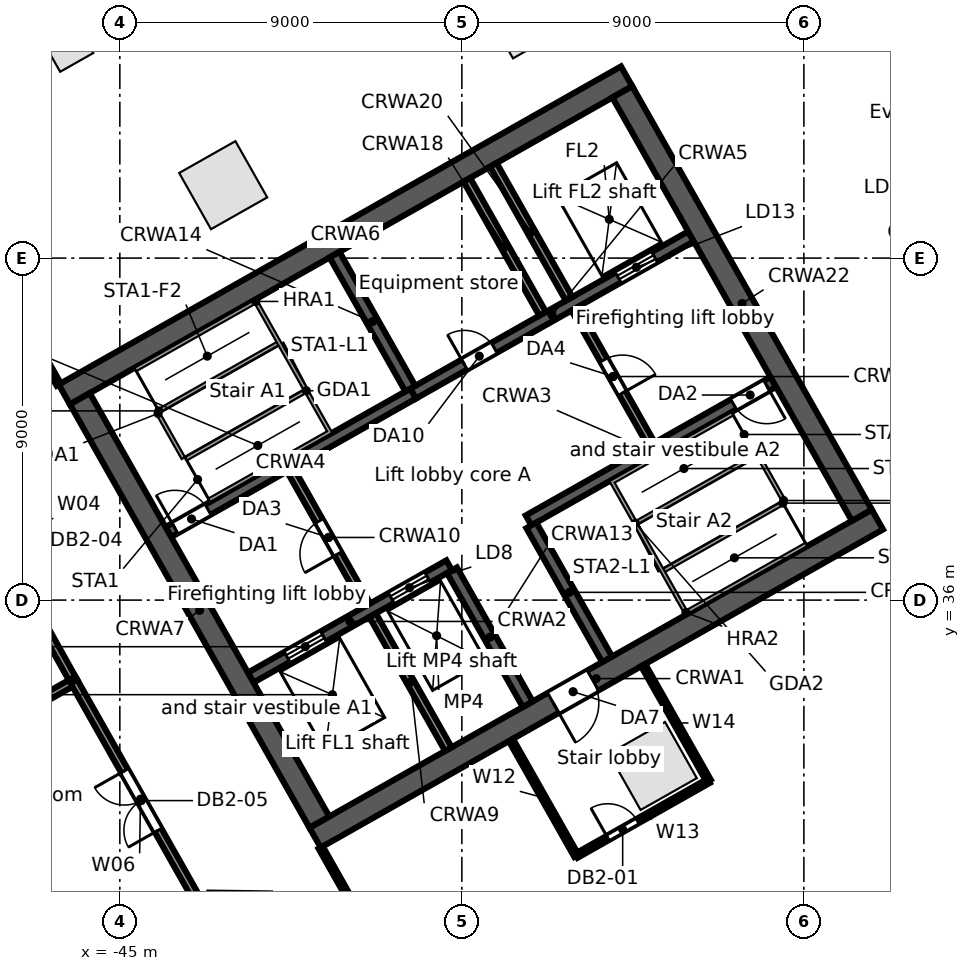
"""IFC4 building model, lengths in metres.
Left out: names, types, materials, properties, quantities, classifications, styles, units other than length and angle.
Written with IfcOpenShell. Run it as: python <this file> out.ifc"""

import sys

from ifc_helpers import new_model, si_unit, direction, frame, frame_2d, origin, origin_2d, place, context, subcontext, project, spatial, rectangle, extrude, element, fill, save


model = new_model("IFC4")
c1 = context("Model", 3, precision=1e-05, world=origin(), true_north=direction((0.0, 1.0)))
c2 = subcontext(c1, "Body", "Model", "MODEL_VIEW")
j1 = project(units=[si_unit("LENGTHUNIT", "METRE"), si_unit("PLANEANGLEUNIT", "RADIAN")], contexts=[c1])
p1 = place(None, origin())
s1 = spatial("IfcSite", under=j1, at=p1, CompositionType="ELEMENT")
p2 = place(p1, origin())
s2 = spatial("IfcBuilding", under=s1, at=p2, CompositionType="ELEMENT")
p3 = place(p2, frame((0.0, 0.0, -9.6)))
s3 = spatial("IfcBuildingStorey", under=s2, at=p3, CompositionType="ELEMENT", Elevation=-9.6)
p4 = place(p3, frame((-5.971, 78.503, -0.5), z_axis=(0.0, 0.0, 1.0), x_axis=(-0.870356741611, -0.492421711882, 0.0)))
e1 = element("IfcWall", 1, at=p4, inside=s3, PredefinedType="SOLIDWALL", context=c2, shape_type="SweptSolid", body=[
    extrude(rectangle(XDim=70.604, YDim=0.8, at=frame_2d((35.302, 0.0))), origin(), (0.0, 0.0, 1.0), 5.3),
])
p5 = place(p3, frame((-66.973, 30.208, -0.5), z_axis=(0.0, 0.0, 1.0), x_axis=(0.85716750858, -0.515037728943, 0.0)))
e2 = element("IfcWall", 2, at=p5, inside=s3, PredefinedType="SOLIDWALL", context=c2, shape_type="SweptSolid", body=[
    extrude(rectangle(XDim=24.44, YDim=0.8, at=frame_2d((12.22, 0.0))), origin(), (0.0, 0.0, 1.0), 5.3),
])
p6 = place(p3, frame((-35.211, 18.197, -0.5), z_axis=(0.0, 0.0, 1.0), x_axis=(0.870356230452, 0.492422615355, 0.0)))
e3 = element("IfcWall", 3, at=p6, inside=s3, PredefinedType="SOLIDWALL", context=c2, shape_type="SweptSolid", body=[
    extrude(rectangle(XDim=41.941, YDim=0.8, at=frame_2d((20.97, 0.0))), origin(), (0.0, 0.0, 1.0), 5.3),
])
for number, where, z_axis, x_axis in (
    (4, (-34.334, 51.414, -0.5), (0.0, 0.0, 1.0), (-0.87, -0.492, 0.0)),
    (5, (-42.28, 46.919, -0.5), (0.0, 0.0, 1.0), (-0.87, -0.492, 0.0)),
    (6, (-30.976, 31.635, -0.5), (0.0, 0.0, 1.0), (0.87, 0.492, 0.0)),
):
    element("IfcColumn", number, at=place(p3, frame(where, z_axis=z_axis, x_axis=x_axis)), inside=s3, PredefinedType="COLUMN", context=c2, shape_type="SweptSolid", body=[
        extrude(rectangle(XDim=1.7, YDim=1.7, at=origin_2d()), origin(), (0.0, 0.0, 1.0), 5.3),
    ])
p7 = place(p3, frame((-46.381, 50.584, -0.5), z_axis=(0.0, 0.0, 1.0), x_axis=(-0.87035569594, -0.492423560103, 0.0)))
e7 = element("IfcColumn", 7, at=p7, inside=s3, PredefinedType="COLUMN", context=c2, shape_type="SweptSolid", body=[
    extrude(rectangle(XDim=1.0, YDim=1.0, at=origin_2d()), origin(), (0.0, 0.0, 1.0), 5.3),
])
p8 = place(p3, frame((-39.862, 29.749, 0.0), z_axis=(0.0, 0.0, 1.0), x_axis=(0.870350116061, 0.492433422375, 0.0)))
e8 = element("IfcWall", 8, at=p8, inside=s3, PredefinedType="SOLIDWALL", context=c2, shape_type="SweptSolid", body=[
    extrude(rectangle(XDim=17.0, YDim=0.6, at=frame_2d((8.5, 0.0))), origin(), (0.0, 0.0, 1.0), 4.4),
])
p9 = place(p8, frame((7.2, 0.0, 0.0)))
e9 = element("IfcOpeningElement", 9, at=p9, cuts=e8, PredefinedType="OPENING", context=c2, shape_type="SweptSolid", body=[
    extrude(rectangle(XDim=1.2, YDim=2.1, at=frame_2d((0.6, 1.05))), frame((0.0, 0.31, 0.0), z_axis=(0.0, -1.0, 0.0), x_axis=(1.0, 0.0, 0.0)), (0.0, 0.0, 1.0), 0.62),
])
p10 = place(p3, frame((-41.556, 33.961, 0.0), z_axis=(0.0, 0.0, 1.0), x_axis=(0.870343731308, 0.492444706919, 0.0)))
e10 = element("IfcWall", 10, at=p10, inside=s3, PredefinedType="SOLIDWALL", context=c2, shape_type="SweptSolid", body=[
    extrude(rectangle(XDim=6.0, YDim=0.3, at=frame_2d((3.0, 0.0))), origin(), (0.0, 0.0, 1.0), 4.4),
])
p11 = place(p10, frame((1.1, 0.0, 0.0)))
e11 = element("IfcOpeningElement", 11, at=p11, cuts=e10, PredefinedType="OPENING", context=c2, shape_type="SweptSolid", body=[
    extrude(rectangle(XDim=1.1, YDim=2.1, at=frame_2d((0.55, 1.05))), frame((0.0, 0.16, 0.0), z_axis=(0.0, -1.0, 0.0), x_axis=(1.0, 0.0, 0.0)), (0.0, 0.0, 1.0), 0.32),
])
p12 = place(p10, frame((4.25, 0.0, 0.0)))
e12 = element("IfcOpeningElement", 12, at=p12, cuts=e10, PredefinedType="OPENING", context=c2, shape_type="SweptSolid", body=[
    extrude(rectangle(XDim=1.1, YDim=2.1, at=frame_2d((0.55, 1.05))), frame((0.0, 0.16, 0.0), z_axis=(0.0, -1.0, 0.0), x_axis=(1.0, 0.0, 0.0)), (0.0, 0.0, 1.0), 0.32),
])
p13 = place(p3, frame((-34.245, 38.097, 0.0), z_axis=(0.0, 0.0, 1.0), x_axis=(0.870364910201, 0.492407273597, 0.0)))
e13 = element("IfcWall", 13, at=p13, inside=s3, PredefinedType="SOLIDWALL", context=c2, shape_type="SweptSolid", body=[
    extrude(rectangle(XDim=7.4, YDim=0.3, at=frame_2d((3.7, 0.0))), origin(), (0.0, 0.0, 1.0), 4.4),
])
p14 = place(p13, frame((6.2, 0.0, 0.0)))
e14 = element("IfcOpeningElement", 14, at=p14, cuts=e13, PredefinedType="OPENING", context=c2, shape_type="SweptSolid", body=[
    extrude(rectangle(XDim=1.0, YDim=2.1, at=frame_2d((0.5, 1.05))), frame((0.0, 0.16, 0.0), z_axis=(0.0, -1.0, 0.0), x_axis=(1.0, 0.0, 0.0)), (0.0, 0.0, 1.0), 0.32),
])
p15 = place(p3, frame((-43.723, 37.791, 0.0), z_axis=(0.0, 0.0, 1.0), x_axis=(0.87035077051, 0.49243226567, 0.0)))
e15 = element("IfcWall", 15, at=p15, inside=s3, PredefinedType="SOLIDWALL", context=c2, shape_type="SweptSolid", body=[
    extrude(rectangle(XDim=7.4, YDim=0.3, at=frame_2d((3.7, 0.0))), origin(), (0.0, 0.0, 1.0), 4.4),
])
p16 = place(p15, frame((0.2, 0.0, 0.0)))
e16 = element("IfcOpeningElement", 16, at=p16, cuts=e15, PredefinedType="OPENING", context=c2, shape_type="SweptSolid", body=[
    extrude(rectangle(XDim=1.0, YDim=2.1, at=frame_2d((0.5, 1.05))), frame((0.0, 0.16, 0.0), z_axis=(0.0, -1.0, 0.0), x_axis=(1.0, 0.0, 0.0)), (0.0, 0.0, 1.0), 0.32),
])
p17 = place(p3, frame((-37.282, 41.435, 0.0), z_axis=(0.0, 0.0, 1.0), x_axis=(0.870356516133, 0.492422110414, 0.0)))
e17 = element("IfcWall", 17, at=p17, inside=s3, PredefinedType="SOLIDWALL", context=c2, shape_type="SweptSolid", body=[
    extrude(rectangle(XDim=8.4, YDim=0.3, at=frame_2d((4.2, 0.0))), origin(), (0.0, 0.0, 1.0), 4.4),
])
p18 = place(p17, frame((6.2, 0.0, 0.0)))
e18 = element("IfcOpeningElement", 18, at=p18, cuts=e17, PredefinedType="OPENING", context=c2, shape_type="SweptSolid", body=[
    extrude(rectangle(XDim=1.1, YDim=2.1, at=frame_2d((0.55, 1.05))), frame((0.0, 0.16, 0.0), z_axis=(0.0, -1.0, 0.0), x_axis=(1.0, 0.0, 0.0)), (0.0, 0.0, 1.0), 0.32),
])
p19 = place(p17, frame((1.55, 0.0, 0.0)))
e19 = element("IfcOpeningElement", 19, at=p19, cuts=e17, PredefinedType="OPENING", context=c2, shape_type="SweptSolid", body=[
    extrude(rectangle(XDim=0.9, YDim=2.1, at=frame_2d((0.45, 1.05))), frame((0.0, 0.16, 0.0), z_axis=(0.0, -1.0, 0.0), x_axis=(1.0, 0.0, 0.0)), (0.0, 0.0, 1.0), 0.32),
])
p20 = place(p3, frame((-46.461, 41.412, 0.0), z_axis=(0.0, 0.0, 1.0), x_axis=(0.870350116061, 0.492433422375, 0.0)))
e20 = element("IfcWall", 20, at=p20, inside=s3, PredefinedType="SOLIDWALL", context=c2, shape_type="SweptSolid", body=[
    extrude(rectangle(XDim=17.0, YDim=0.6, at=frame_2d((8.5, 0.0))), origin(), (0.0, 0.0, 1.0), 4.4),
])
p21 = place(p3, frame((-46.052, 41.298, 0.0), z_axis=(0.0, 0.0, 1.0), x_axis=(0.492418598281, -0.870358503186, 0.0)))
e21 = element("IfcWall", 21, at=p21, inside=s3, PredefinedType="SOLIDWALL", context=c2, shape_type="SweptSolid", body=[
    extrude(rectangle(XDim=12.8, YDim=0.6, at=frame_2d((6.4, 0.0))), origin(), (0.0, 0.0, 1.0), 4.4),
])
p22 = place(p3, frame((-38.349, 35.603, 0.0), z_axis=(0.0, 0.0, 1.0), x_axis=(0.49241474071, -0.870360685654, 0.0)))
e22 = element("IfcWall", 22, at=p22, inside=s3, PredefinedType="SOLIDWALL", context=c2, shape_type="SweptSolid", body=[
    extrude(rectangle(XDim=4.05, YDim=0.2, at=frame_2d((2.025, 0.0))), origin(), (0.0, 0.0, 1.0), 4.4),
])
p23 = place(p3, frame((-40.516, 39.433, 0.0), z_axis=(0.0, 0.0, 1.0), x_axis=(0.492453559952, -0.87033872216, 0.0)))
e23 = element("IfcWall", 23, at=p23, inside=s3, PredefinedType="PARTITIONING", context=c2, shape_type="SweptSolid", body=[
    extrude(rectangle(XDim=4.1, YDim=0.2, at=frame_2d((2.05, 0.0))), origin(), (0.0, 0.0, 1.0), 4.4),
])
p24 = place(p23, frame((1.55, 0.0, 0.0)))
e24 = element("IfcOpeningElement", 24, at=p24, cuts=e23, PredefinedType="OPENING", context=c2, shape_type="SweptSolid", body=[
    extrude(rectangle(XDim=1.0, YDim=2.1, at=frame_2d((0.5, 1.05))), frame((0.0, 0.11, 0.0), z_axis=(0.0, -1.0, 0.0), x_axis=(1.0, 0.0, 0.0)), (0.0, 0.0, 1.0), 0.22),
])
p25 = place(p3, frame((-36.26, 36.785, 0.0), z_axis=(0.0, 0.0, 1.0), x_axis=(0.492440575896, -0.870346068648, 0.0)))
e25 = element("IfcWall", 25, at=p25, inside=s3, PredefinedType="SOLIDWALL", context=c2, shape_type="SweptSolid", body=[
    extrude(rectangle(XDim=4.05, YDim=0.3, at=frame_2d((2.025, 0.0))), origin(), (0.0, 0.0, 1.0), 4.4),
])
p26 = place(p3, frame((-39.35, 45.09, 0.0), z_axis=(0.0, 0.0, 1.0), x_axis=(0.49241474071, -0.870360685654, 0.0)))
e26 = element("IfcWall", 26, at=p26, inside=s3, PredefinedType="SOLIDWALL", context=c2, shape_type="SweptSolid", body=[
    extrude(rectangle(XDim=4.05, YDim=0.3, at=frame_2d((2.025, 0.0))), origin(), (0.0, 0.0, 1.0), 4.4),
])
p27 = place(p3, frame((-34.171, 37.967, 0.0), z_axis=(0.0, 0.0, 1.0), x_axis=(0.492394910396, -0.870371904542, 0.0)))
e27 = element("IfcWall", 27, at=p27, inside=s3, PredefinedType="SOLIDWALL", context=c2, shape_type="SweptSolid", body=[
    extrude(rectangle(XDim=4.05, YDim=0.3, at=frame_2d((2.025, 0.0))), origin(), (0.0, 0.0, 1.0), 4.4),
])
p28 = place(p3, frame((-35.869, 47.06, 0.0), z_axis=(0.0, 0.0, 1.0), x_axis=(0.49241474071, -0.870360685654, 0.0)))
e28 = element("IfcWall", 28, at=p28, inside=s3, PredefinedType="SOLIDWALL", context=c2, shape_type="SweptSolid", body=[
    extrude(rectangle(XDim=4.05, YDim=0.2, at=frame_2d((2.025, 0.0))), origin(), (0.0, 0.0, 1.0), 4.4),
])
p29 = place(p3, frame((-33.031, 43.667, 0.0), z_axis=(0.0, 0.0, 1.0), x_axis=(0.492408451753, -0.87036424366, 0.0)))
e29 = element("IfcWall", 29, at=p29, inside=s3, PredefinedType="PARTITIONING", context=c2, shape_type="SweptSolid", body=[
    extrude(rectangle(XDim=4.1, YDim=0.2, at=frame_2d((2.05, 0.0))), origin(), (0.0, 0.0, 1.0), 4.4),
])
p30 = place(p29, frame((1.55, 0.0, 0.0)))
e30 = element("IfcOpeningElement", 30, at=p30, cuts=e29, PredefinedType="OPENING", context=c2, shape_type="SweptSolid", body=[
    extrude(rectangle(XDim=1.0, YDim=2.1, at=frame_2d((0.5, 1.05))), frame((0.0, 0.11, 0.0), z_axis=(0.0, -1.0, 0.0), x_axis=(1.0, 0.0, 0.0)), (0.0, 0.0, 1.0), 0.22),
])
p31 = place(p3, frame((-35.173, 47.454, 0.0), z_axis=(0.0, 0.0, 1.0), x_axis=(0.492440575896, -0.870346068648, 0.0)))
e31 = element("IfcWall", 31, at=p31, inside=s3, PredefinedType="SOLIDWALL", context=c2, shape_type="SweptSolid", body=[
    extrude(rectangle(XDim=4.05, YDim=0.2, at=frame_2d((2.025, 0.0))), origin(), (0.0, 0.0, 1.0), 4.4),
])
p32 = place(p3, frame((-31.778, 49.374, 0.0), z_axis=(0.0, 0.0, 1.0), x_axis=(0.492433046652, -0.870350328641, 0.0)))
e32 = element("IfcWall", 32, at=p32, inside=s3, PredefinedType="SOLIDWALL", context=c2, shape_type="SweptSolid", body=[
    extrude(rectangle(XDim=12.8, YDim=0.6, at=frame_2d((6.4, 0.0))), origin(), (0.0, 0.0, 1.0), 4.4),
])
p33 = place(p3, frame((-52.342, 51.808, 0.0), z_axis=(0.0, 0.0, 1.0), x_axis=(0.492361213904, -0.870390966775, 0.0)))
e33 = element("IfcWall", 33, at=p33, inside=s3, PredefinedType="PARTITIONING", context=c2, shape_type="SweptSolid", body=[
    extrude(rectangle(XDim=11.644, YDim=0.125, at=frame_2d((5.822, 0.0))), origin(), (0.0, 0.0, 1.0), 3.68),
])
p34 = place(p33, frame((5.45, 0.0, 0.0)))
e34 = element("IfcOpeningElement", 34, at=p34, cuts=e33, PredefinedType="OPENING", context=c2, shape_type="SweptSolid", body=[
    extrude(rectangle(XDim=0.9, YDim=2.1, at=frame_2d((0.45, 1.05))), frame((0.0, 0.073, 0.0), z_axis=(0.0, -1.0, 0.0), x_axis=(1.0, 0.0, 0.0)), (0.0, 0.0, 1.0), 0.145),
])
p35 = place(p3, frame((-51.43, 30.902, 0.0), z_axis=(0.0, 0.0, 1.0), x_axis=(0.85415757912, -0.52001425945, 0.0)))
e35 = element("IfcWall", 35, at=p35, inside=s3, PredefinedType="PARTITIONING", context=c2, shape_type="SweptSolid", body=[
    extrude(rectangle(XDim=12.311, YDim=0.2, at=frame_2d((6.156, 0.0))), origin(), (0.0, 0.0, 1.0), 3.768),
])
p36 = place(p3, frame((-50.397, 41.35, 0.0), z_axis=(0.0, 0.0, 1.0), x_axis=(0.487964129566, -0.872863682517, 0.0)))
e36 = element("IfcWall", 36, at=p36, inside=s3, PredefinedType="PARTITIONING", context=c2, shape_type="SweptSolid", body=[
    extrude(rectangle(XDim=8.584, YDim=0.2, at=frame_2d((4.292, 0.0))), origin(), (0.0, 0.0, 1.0), 3.462),
])
p37 = place(p36, frame((3.45, 0.0, 0.0)))
e37 = element("IfcOpeningElement", 37, at=p37, cuts=e36, PredefinedType="OPENING", context=c2, shape_type="SweptSolid", body=[
    extrude(rectangle(XDim=1.8, YDim=2.1, at=frame_2d((0.9, 1.05))), frame((0.0, 0.11, 0.0), z_axis=(0.0, -1.0, 0.0), x_axis=(1.0, 0.0, 0.0)), (0.0, 0.0, 1.0), 0.22),
])
p38 = place(p3, frame((-49.928, 31.752, 0.0), z_axis=(0.0, 0.0, 1.0), x_axis=(0.87032337569, 0.492480681578, 0.0)))
e38 = element("IfcWall", 38, at=p38, inside=s3, PredefinedType="PARTITIONING", context=c2, shape_type="SweptSolid", body=[
    extrude(rectangle(XDim=4.274, YDim=0.2, at=frame_2d((2.137, 0.0))), origin(), (0.0, 0.0, 1.0), 4.4),
])
p39 = place(p3, frame((-46.208, 33.857, 0.0), z_axis=(0.0, 0.0, 1.0), x_axis=(0.492349035507, -0.870397855716, 0.0)))
e39 = element("IfcWall", 39, at=p39, inside=s3, PredefinedType="PARTITIONING", context=c2, shape_type="SweptSolid", body=[
    extrude(rectangle(XDim=7.113, YDim=0.2, at=frame_2d((3.556, 0.0))), origin(), (0.0, 0.0, 1.0), 3.68),
])
p40 = place(p39, frame((2.7, 0.0, 0.0)))
e40 = element("IfcOpeningElement", 40, at=p40, cuts=e39, PredefinedType="OPENING", context=c2, shape_type="SweptSolid", body=[
    extrude(rectangle(XDim=1.8, YDim=2.1, at=frame_2d((0.9, 1.05))), frame((0.0, 0.11, 0.0), z_axis=(0.0, -1.0, 0.0), x_axis=(1.0, 0.0, 0.0)), (0.0, 0.0, 1.0), 0.22),
])
p41 = place(p3, frame((-39.715, 29.488, 0.0), z_axis=(0.0, 0.0, 1.0), x_axis=(0.492486226821, -0.870320237839, 0.0)))
e41 = element("IfcWall", 41, at=p41, inside=s3, PredefinedType="PARTITIONING", context=c2, shape_type="SweptSolid", body=[
    extrude(rectangle(XDim=9.75, YDim=0.125, at=frame_2d((4.875, 0.0))), origin(), (0.0, 0.0, 1.0), 3.672),
])
p42 = place(p3, frame((-34.71, 32.319, 0.0), z_axis=(0.0, 0.0, 1.0), x_axis=(0.492310098002, -0.870419879946, 0.0)))
e42 = element("IfcWall", 42, at=p42, inside=s3, PredefinedType="PARTITIONING", context=c2, shape_type="SweptSolid", body=[
    extrude(rectangle(XDim=3.5, YDim=0.125, at=frame_2d((1.75, 0.0))), origin(), (0.0, 0.0, 1.0), 3.672),
])
p43 = place(p3, frame((-32.987, 29.273, 0.0), z_axis=(0.0, 0.0, 1.0), x_axis=(0.87037183571, 0.492395032065, 0.0)))
e43 = element("IfcWall", 43, at=p43, inside=s3, PredefinedType="PARTITIONING", context=c2, shape_type="SweptSolid", body=[
    extrude(rectangle(XDim=4.001, YDim=0.125, at=frame_2d((2.0, 0.0))), origin(), (0.0, 0.0, 1.0), 3.78),
])
p44 = place(p43, frame((0.95, 0.0, 0.0)))
e44 = element("IfcOpeningElement", 44, at=p44, cuts=e43, PredefinedType="OPENING", context=c2, shape_type="SweptSolid", body=[
    extrude(rectangle(XDim=0.9, YDim=2.1, at=frame_2d((0.45, 1.05))), frame((0.0, 0.073, 0.0), z_axis=(0.0, -1.0, 0.0), x_axis=(1.0, 0.0, 0.0)), (0.0, 0.0, 1.0), 0.145),
])
p45 = place(p3, frame((-31.229, 34.289, 0.0), z_axis=(0.0, 0.0, 1.0), x_axis=(0.492574298942, -0.870270394775, 0.0)))
e45 = element("IfcWall", 45, at=p45, inside=s3, PredefinedType="PARTITIONING", context=c2, shape_type="SweptSolid", body=[
    extrude(rectangle(XDim=3.5, YDim=0.125, at=frame_2d((1.75, 0.0))), origin(), (0.0, 0.0, 1.0), 3.768),
])
p46 = place(p18, origin())
e46 = element("IfcDoor", 46, at=p46, inside=s3, OperationType="DOUBLE_DOOR_SLIDING", PredefinedType="DOOR", context=c2, shape_type="SweptSolid", body=[
    extrude(rectangle(XDim=1.1, YDim=2.1, at=frame_2d((0.55, 1.05))), frame((0.0, 0.025, 0.0), z_axis=(0.0, -1.0, 0.0), x_axis=(1.0, 0.0, 0.0)), (0.0, 0.0, 1.0), 0.05),
])
fill(e18, e46)
p47 = place(p11, origin())
e47 = element("IfcDoor", 47, at=p47, inside=s3, OperationType="DOUBLE_DOOR_SLIDING", PredefinedType="DOOR", context=c2, shape_type="SweptSolid", body=[
    extrude(rectangle(XDim=1.1, YDim=2.1, at=frame_2d((0.55, 1.05))), frame((0.0, 0.025, 0.0), z_axis=(0.0, -1.0, 0.0), x_axis=(1.0, 0.0, 0.0)), (0.0, 0.0, 1.0), 0.05),
])
fill(e11, e47)
p48 = place(p12, origin())
e48 = element("IfcDoor", 48, at=p48, inside=s3, OperationType="DOUBLE_DOOR_SLIDING", PredefinedType="DOOR", context=c2, shape_type="SweptSolid", body=[
    extrude(rectangle(XDim=1.1, YDim=2.1, at=frame_2d((0.55, 1.05))), frame((0.0, 0.025, 0.0), z_axis=(0.0, -1.0, 0.0), x_axis=(1.0, 0.0, 0.0)), (0.0, 0.0, 1.0), 0.05),
])
fill(e12, e48)
p49 = place(p16, origin())
e49 = element("IfcDoor", 49, at=p49, inside=s3, OperationType="SINGLE_SWING_LEFT", PredefinedType="DOOR", context=c2, shape_type="SweptSolid", body=[
    extrude(rectangle(XDim=1.0, YDim=2.1, at=frame_2d((0.5, 1.05))), frame((0.0, 0.025, 0.0), z_axis=(0.0, -1.0, 0.0), x_axis=(1.0, 0.0, 0.0)), (0.0, 0.0, 1.0), 0.05),
])
fill(e16, e49)
p50 = place(p14, frame((1.0, 0.0, 0.0), z_axis=(0.0, 0.0, 1.0), x_axis=(-1.0, 0.0, 0.0)))
e50 = element("IfcDoor", 50, at=p50, inside=s3, OperationType="SINGLE_SWING_LEFT", PredefinedType="DOOR", context=c2, shape_type="SweptSolid", body=[
    extrude(rectangle(XDim=1.0, YDim=2.1, at=frame_2d((0.5, 1.05))), frame((0.0, 0.025, 0.0), z_axis=(0.0, -1.0, 0.0), x_axis=(1.0, 0.0, 0.0)), (0.0, 0.0, 1.0), 0.05),
])
fill(e14, e50)
p51 = place(p24, frame((1.0, 0.0, 0.0), z_axis=(0.0, 0.0, 1.0), x_axis=(-1.0, 0.0, 0.0)))
e51 = element("IfcDoor", 51, at=p51, inside=s3, OperationType="SINGLE_SWING_LEFT", PredefinedType="DOOR", context=c2, shape_type="SweptSolid", body=[
    extrude(rectangle(XDim=1.0, YDim=2.1, at=frame_2d((0.5, 1.05))), frame((0.0, 0.025, 0.0), z_axis=(0.0, -1.0, 0.0), x_axis=(1.0, 0.0, 0.0)), (0.0, 0.0, 1.0), 0.05),
])
fill(e24, e51)
p52 = place(p30, origin())
e52 = element("IfcDoor", 52, at=p52, inside=s3, OperationType="SINGLE_SWING_RIGHT", PredefinedType="DOOR", context=c2, shape_type="SweptSolid", body=[
    extrude(rectangle(XDim=1.0, YDim=2.1, at=frame_2d((0.5, 1.05))), frame((0.0, 0.025, 0.0), z_axis=(0.0, -1.0, 0.0), x_axis=(1.0, 0.0, 0.0)), (0.0, 0.0, 1.0), 0.05),
])
fill(e30, e52)
p53 = place(p9, frame((1.2, 0.0, 0.0), z_axis=(0.0, 0.0, 1.0), x_axis=(-1.0, 0.0, 0.0)))
e53 = element("IfcDoor", 53, at=p53, inside=s3, OperationType="SINGLE_SWING_RIGHT", PredefinedType="DOOR", context=c2, shape_type="SweptSolid", body=[
    extrude(rectangle(XDim=1.2, YDim=2.1, at=frame_2d((0.6, 1.05))), frame((0.0, 0.025, 0.0), z_axis=(0.0, -1.0, 0.0), x_axis=(1.0, 0.0, 0.0)), (0.0, 0.0, 1.0), 0.05),
])
fill(e9, e53)
p54 = place(p19, origin())
e54 = element("IfcDoor", 54, at=p54, inside=s3, OperationType="SINGLE_SWING_LEFT", PredefinedType="DOOR", context=c2, shape_type="SweptSolid", body=[
    extrude(rectangle(XDim=0.9, YDim=2.1, at=frame_2d((0.45, 1.05))), frame((0.0, 0.025, 0.0), z_axis=(0.0, -1.0, 0.0), x_axis=(1.0, 0.0, 0.0)), (0.0, 0.0, 1.0), 0.05),
])
fill(e19, e54)
p55 = place(p44, origin())
e55 = element("IfcDoor", 55, at=p55, inside=s3, OperationType="SINGLE_SWING_LEFT", PredefinedType="DOOR", context=c2, shape_type="SweptSolid", body=[
    extrude(rectangle(XDim=0.9, YDim=2.1, at=frame_2d((0.45, 1.05))), frame((0.0, 0.025, 0.0), z_axis=(0.0, -1.0, 0.0), x_axis=(1.0, 0.0, 0.0)), (0.0, 0.0, 1.0), 0.05),
])
fill(e44, e55)
p56 = place(p40, frame((1.8, 0.0, 0.0), z_axis=(0.0, 0.0, 1.0), x_axis=(-1.0, 0.0, 0.0)))
e56 = element("IfcDoor", 56, at=p56, inside=s3, OperationType="DOUBLE_DOOR_SINGLE_SWING", PredefinedType="DOOR", context=c2, shape_type="SweptSolid", body=[
    extrude(rectangle(XDim=1.8, YDim=2.1, at=frame_2d((0.9, 1.05))), frame((0.0, 0.025, 0.0), z_axis=(0.0, -1.0, 0.0), x_axis=(1.0, 0.0, 0.0)), (0.0, 0.0, 1.0), 0.05),
])
fill(e40, e56)
save(model, sys.argv[1])
